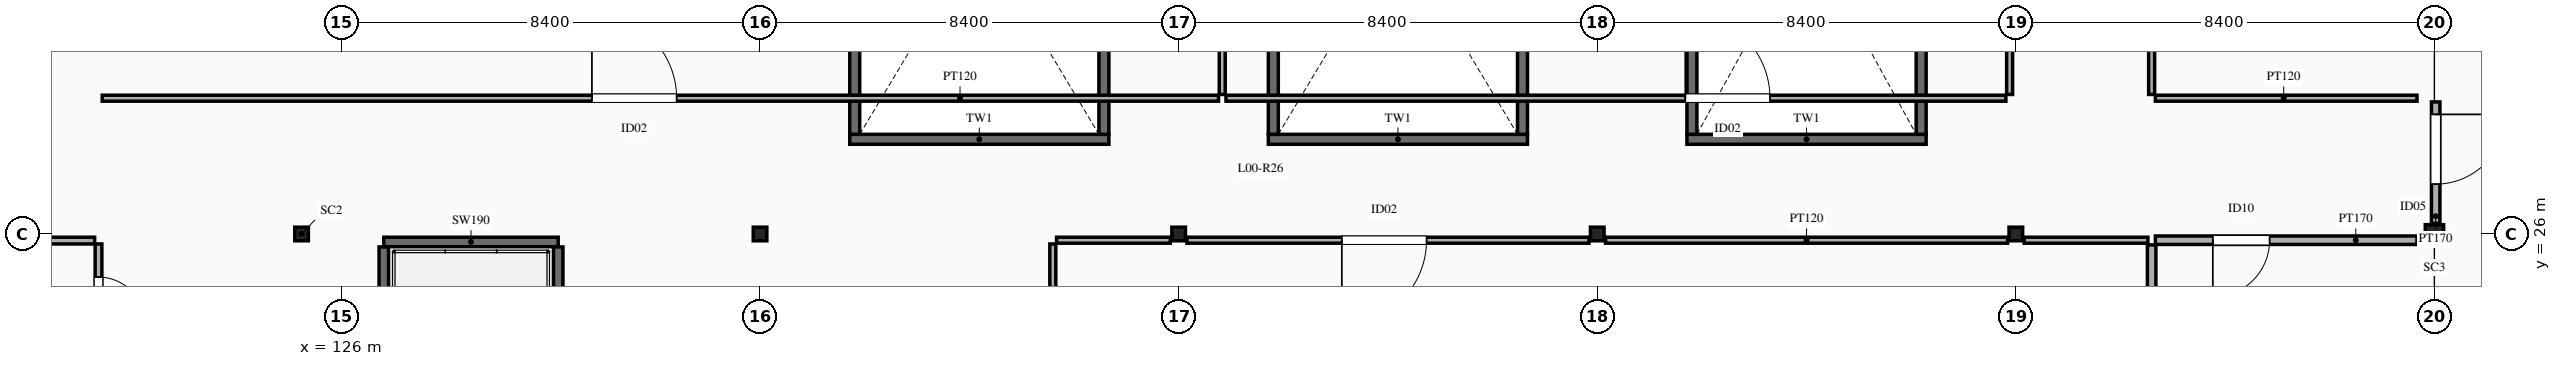
"""IFC4 building model, lengths in metres.
Left out: names, types, materials, properties, quantities, classifications, styles, units other than length and angle.
Written with IfcOpenShell. Run it as: python <this file> out.ifc"""

import sys

from ifc_helpers import new_model, si_unit, direction, frame, frame_2d, origin, origin_2d, place, context, subcontext, project, spatial, rectangle, hollow_circle, i_section, extrude, element, fill, save


model = new_model("IFC4")
c1 = context("Model", 3, precision=1e-05, world=origin(), true_north=direction((0.0, 1.0)))
c2 = subcontext(c1, "Body", "Model", "MODEL_VIEW")
j1 = project(units=[si_unit("LENGTHUNIT", "METRE"), si_unit("PLANEANGLEUNIT", "RADIAN")], contexts=[c1])
p1 = place(None, origin())
s1 = spatial("IfcSite", under=j1, at=p1, CompositionType="ELEMENT")
p2 = place(p1, origin())
s2 = spatial("IfcBuilding", under=s1, at=p2, CompositionType="ELEMENT")
p3 = place(p2, origin())
s3 = spatial("IfcBuildingStorey", under=s2, at=p3, CompositionType="ELEMENT", Elevation=0.0)
p4 = place(p3, frame((168.0, 26.0, 0.0), z_axis=(0.0, 0.0, 1.0), x_axis=(1.0, 0.0, 0.0)))
e1 = element("IfcColumn", 1, at=p4, inside=s3, PredefinedType="COLUMN", context=c2, shape_type="SweptSolid", body=[
    extrude(i_section(OverallWidth=0.373, OverallDepth=0.368, WebThickness=0.014, FlangeThickness=0.024, FilletRadius=0.015, at=origin_2d()), origin(), (0.0, 0.0, 1.0), 5.4),
])
for number, where, z_axis, x_axis in (
    (2, (125.2, 26.0, 0.0), (0.0, 0.0, 1.0), (1.0, 0.0, 0.0)),
    (3, (134.4, 26.0, 0.0), (0.0, 0.0, 1.0), (1.0, 0.0, 0.0)),
    (4, (142.8, 26.0, 0.0), (0.0, 0.0, 1.0), (1.0, 0.0, 0.0)),
    (5, (151.2, 26.0, 0.0), (0.0, 0.0, 1.0), (1.0, 0.0, 0.0)),
    (6, (159.6, 26.0, 0.0), (0.0, 0.0, 1.0), (1.0, 0.0, 0.0)),
):
    element("IfcColumn", number, at=place(p3, frame(where, z_axis=z_axis, x_axis=x_axis)), inside=s3, PredefinedType="COLUMN", context=c2, shape_type="SweptSolid", body=[
        extrude(hollow_circle(Radius=0.136, WallThickness=0.01, at=origin_2d()), origin(), (0.0, 0.0, 1.0), 5.2),
    ])
p5 = place(p3, frame((136.2, 27.9, -0.45), z_axis=(0.0, 0.0, 1.0), x_axis=(1.0, 0.0, 0.0)))
e7 = element("IfcWall", 7, at=p5, inside=s3, PredefinedType="SOLIDWALL", context=c2, shape_type="SweptSolid", body=[
    extrude(rectangle(XDim=5.2, YDim=0.2, at=frame_2d((2.6, 0.0))), origin(), (0.0, 0.0, 1.0), 0.23),
])
for number, where, z_axis, x_axis in (
    (8, (136.3, 28.0, -0.45), (0.0, 0.0, 1.0), (0.0, 1.0, 0.0)),
    (9, (141.3, 28.0, -0.45), (0.0, 0.0, 1.0), (0.0, 1.0, 0.0)),
):
    element("IfcWall", number, at=place(p3, frame(where, z_axis=z_axis, x_axis=x_axis)), inside=s3, PredefinedType="SOLIDWALL", context=c2, shape_type="SweptSolid", body=[
        extrude(rectangle(XDim=8.0, YDim=0.2, at=frame_2d((4.0, 0.0))), origin(), (0.0, 0.0, 1.0), 0.23),
    ])
p6 = place(p3, frame((144.6, 27.9, -0.45), z_axis=(0.0, 0.0, 1.0), x_axis=(1.0, 0.0, 0.0)))
e10 = element("IfcWall", 10, at=p6, inside=s3, PredefinedType="SOLIDWALL", context=c2, shape_type="SweptSolid", body=[
    extrude(rectangle(XDim=5.2, YDim=0.2, at=frame_2d((2.6, 0.0))), origin(), (0.0, 0.0, 1.0), 0.23),
])
for number, where, z_axis, x_axis in (
    (11, (144.7, 28.0, -0.45), (0.0, 0.0, 1.0), (0.0, 1.0, 0.0)),
    (12, (149.7, 28.0, -0.45), (0.0, 0.0, 1.0), (0.0, 1.0, 0.0)),
):
    element("IfcWall", number, at=place(p3, frame(where, z_axis=z_axis, x_axis=x_axis)), inside=s3, PredefinedType="SOLIDWALL", context=c2, shape_type="SweptSolid", body=[
        extrude(rectangle(XDim=8.0, YDim=0.2, at=frame_2d((4.0, 0.0))), origin(), (0.0, 0.0, 1.0), 0.23),
    ])
p7 = place(p3, frame((153.0, 27.9, -0.45), z_axis=(0.0, 0.0, 1.0), x_axis=(1.0, 0.0, 0.0)))
e13 = element("IfcWall", 13, at=p7, inside=s3, PredefinedType="SOLIDWALL", context=c2, shape_type="SweptSolid", body=[
    extrude(rectangle(XDim=4.8, YDim=0.2, at=frame_2d((2.4, 0.0))), origin(), (0.0, 0.0, 1.0), 0.23),
])
for number, where, z_axis, x_axis in (
    (14, (153.1, 28.0, -0.45), (0.0, 0.0, 1.0), (0.0, 1.0, 0.0)),
    (15, (157.7, 28.0, -0.45), (0.0, 0.0, 1.0), (0.0, 1.0, 0.0)),
):
    element("IfcWall", number, at=place(p3, frame(where, z_axis=z_axis, x_axis=x_axis)), inside=s3, PredefinedType="SOLIDWALL", context=c2, shape_type="SweptSolid", body=[
        extrude(rectangle(XDim=8.0, YDim=0.2, at=frame_2d((4.0, 0.0))), origin(), (0.0, 0.0, 1.0), 0.23),
    ])
p8 = place(p3, frame((126.85, 25.84, 0.0), z_axis=(0.0, 0.0, 1.0), x_axis=(1.0, 0.0, 0.0)))
e16 = element("IfcWall", 16, at=p8, inside=s3, PredefinedType="SOLIDWALL", context=c2, shape_type="SweptSolid", body=[
    extrude(rectangle(XDim=3.5, YDim=0.19, at=frame_2d((1.75, 0.0))), origin(), (0.0, 0.0, 1.0), 5.2),
])
p9 = place(p3, frame((126.85, 18.14, 0.0), z_axis=(0.0, 0.0, 1.0), x_axis=(0.0, 1.0, 0.0)))
e17 = element("IfcWall", 17, at=p9, inside=s3, PredefinedType="SOLIDWALL", context=c2, shape_type="SweptSolid", body=[
    extrude(rectangle(XDim=7.6, YDim=0.19, at=frame_2d((3.8, 0.0))), origin(), (0.0, 0.0, 1.0), 5.2),
])
p10 = place(p9, frame((0.66, 0.0, 0.0)))
e18 = element("IfcOpeningElement", 18, at=p10, cuts=e17, PredefinedType="OPENING", context=c2, shape_type="SweptSolid", body=[
    extrude(rectangle(XDim=1.08, YDim=2.15, at=frame_2d((0.54, 1.075))), frame((0.0, 0.105, 0.0), z_axis=(0.0, -1.0, 0.0), x_axis=(1.0, 0.0, 0.0)), (0.0, 0.0, 1.0), 0.21),
])
p11 = place(p3, frame((130.35, 18.14, 0.0), z_axis=(0.0, 0.0, 1.0), x_axis=(0.0, 1.0, 0.0)))
e19 = element("IfcWall", 19, at=p11, inside=s3, PredefinedType="SOLIDWALL", context=c2, shape_type="SweptSolid", body=[
    extrude(rectangle(XDim=7.6, YDim=0.19, at=frame_2d((3.8, 0.0))), origin(), (0.0, 0.0, 1.0), 5.2),
])
p12 = place(p11, frame((0.36, 0.0, 0.0)))
e20 = element("IfcOpeningElement", 20, at=p12, cuts=e19, PredefinedType="OPENING", context=c2, shape_type="SweptSolid", body=[
    extrude(rectangle(XDim=1.08, YDim=2.15, at=frame_2d((0.54, 1.075))), frame((0.0, 0.105, 0.0), z_axis=(0.0, -1.0, 0.0), x_axis=(1.0, 0.0, 0.0)), (0.0, 0.0, 1.0), 0.21),
])
p13 = place(p3, frame((121.125, 23.55, 0.0), z_axis=(0.0, 0.0, 1.0), x_axis=(0.0, 1.0, 0.0)))
e21 = element("IfcWall", 21, at=p13, inside=s3, PredefinedType="PARTITIONING", context=c2, shape_type="SweptSolid", body=[
    extrude(rectangle(XDim=2.25, YDim=0.135, at=frame_2d((1.125, 0.0))), origin(), (0.0, 0.0, 1.0), 4.35),
])
p14 = place(p13, frame((0.665, 0.0, 0.0)))
e22 = element("IfcOpeningElement", 22, at=p14, cuts=e21, PredefinedType="OPENING", context=c2, shape_type="SweptSolid", body=[
    extrude(rectangle(XDim=0.92, YDim=2.12, at=frame_2d((0.46, 1.06))), frame((0.0, 0.077, 0.0), z_axis=(0.0, -1.0, 0.0), x_axis=(1.0, 0.0, 0.0)), (0.0, 0.0, 1.0), 0.155),
])
p15 = place(p3, frame((140.275, 21.35, 0.0), z_axis=(0.0, 0.0, 1.0), x_axis=(0.0, 1.0, 0.0)))
e23 = element("IfcWall", 23, at=p15, inside=s3, PredefinedType="PARTITIONING", context=c2, shape_type="SweptSolid", body=[
    extrude(rectangle(XDim=4.45, YDim=0.12, at=frame_2d((2.225, 0.0))), origin(), (0.0, 0.0, 1.0), 4.35),
])
p16 = place(p3, frame((121.2, 28.725, 0.0), z_axis=(0.0, 0.0, 1.0), x_axis=(1.0, 0.0, 0.0)))
e24 = element("IfcWall", 24, at=p16, inside=s3, PredefinedType="PARTITIONING", context=c2, shape_type="SweptSolid", body=[
    extrude(rectangle(XDim=22.4, YDim=0.12, at=frame_2d((11.2, 0.0))), origin(), (0.0, 0.0, 1.0), 4.35),
])
p17 = place(p16, frame((9.826, 0.0, 0.0)))
e25 = element("IfcOpeningElement", 25, at=p17, cuts=e24, PredefinedType="OPENING", context=c2, shape_type="SweptSolid", body=[
    extrude(rectangle(XDim=1.7, YDim=2.4, at=frame_2d((0.85, 1.2))), frame((0.0, 0.07, 0.0), z_axis=(0.0, -1.0, 0.0), x_axis=(1.0, 0.0, 0.0)), (0.0, 0.0, 1.0), 0.14),
])
p18 = place(p3, frame((140.35, 25.875, 0.0), z_axis=(0.0, 0.0, 1.0), x_axis=(1.0, 0.0, 0.0)))
e26 = element("IfcWall", 26, at=p18, inside=s3, PredefinedType="PARTITIONING", context=c2, shape_type="SweptSolid", body=[
    extrude(rectangle(XDim=2.283, YDim=0.12, at=frame_2d((1.142, 0.0))), origin(), (0.0, 0.0, 1.0), 4.35),
])
p19 = place(p3, frame((142.967, 25.875, 0.0), z_axis=(0.0, 0.0, 1.0), x_axis=(1.0, 0.0, 0.0)))
e27 = element("IfcWall", 27, at=p19, inside=s3, PredefinedType="PARTITIONING", context=c2, shape_type="SweptSolid", body=[
    extrude(rectangle(XDim=8.067, YDim=0.12, at=frame_2d((4.033, 0.0))), origin(), (0.0, 0.0, 1.0), 4.35),
])
p20 = place(p19, frame((3.108, 0.0, 0.0)))
e28 = element("IfcOpeningElement", 28, at=p20, cuts=e27, PredefinedType="OPENING", context=c2, shape_type="SweptSolid", body=[
    extrude(rectangle(XDim=1.7, YDim=2.4, at=frame_2d((0.85, 1.2))), frame((0.0, 0.07, 0.0), z_axis=(0.0, -1.0, 0.0), x_axis=(1.0, 0.0, 0.0)), (0.0, 0.0, 1.0), 0.14),
])
p21 = place(p3, frame((151.366, 25.875, 0.0), z_axis=(0.0, 0.0, 1.0), x_axis=(1.0, 0.0, 0.0)))
e29 = element("IfcWall", 29, at=p21, inside=s3, PredefinedType="PARTITIONING", context=c2, shape_type="SweptSolid", body=[
    extrude(rectangle(XDim=8.067, YDim=0.12, at=frame_2d((4.034, 0.0))), origin(), (0.0, 0.0, 1.0), 4.35),
])
p22 = place(p3, frame((159.767, 25.875, 0.0), z_axis=(0.0, 0.0, 1.0), x_axis=(1.0, 0.0, 0.0)))
e30 = element("IfcWall", 30, at=p22, inside=s3, PredefinedType="PARTITIONING", context=c2, shape_type="SweptSolid", body=[
    extrude(rectangle(XDim=2.483, YDim=0.12, at=frame_2d((1.242, 0.0))), origin(), (0.0, 0.0, 1.0), 4.35),
])
p23 = place(p3, frame((143.75, 28.725, 0.0), z_axis=(0.0, 0.0, 1.0), x_axis=(1.0, 0.0, 0.0)))
e31 = element("IfcWall", 31, at=p23, inside=s3, PredefinedType="PARTITIONING", context=c2, shape_type="SweptSolid", body=[
    extrude(rectangle(XDim=15.65, YDim=0.12, at=frame_2d((7.825, 0.0))), origin(), (0.0, 0.0, 1.0), 4.35),
])
p24 = place(p23, frame((9.217, 0.0, 0.0)))
e32 = element("IfcOpeningElement", 32, at=p24, cuts=e31, PredefinedType="OPENING", context=c2, shape_type="SweptSolid", body=[
    extrude(rectangle(XDim=1.7, YDim=2.4, at=frame_2d((0.85, 1.2))), frame((0.0, 0.07, 0.0), z_axis=(0.0, -1.0, 0.0), x_axis=(1.0, 0.0, 0.0)), (0.0, 0.0, 1.0), 0.14),
])
p25 = place(p3, frame((162.4, 25.875, 0.0), z_axis=(0.0, 0.0, 1.0), x_axis=(1.0, 0.0, 0.0)))
e33 = element("IfcWall", 33, at=p25, inside=s3, PredefinedType="PARTITIONING", context=c2, shape_type="SweptSolid", body=[
    extrude(rectangle(XDim=5.25, YDim=0.17, at=frame_2d((2.625, 0.0))), origin(), (0.0, 0.0, 1.0), 4.35),
])
p26 = place(p25, frame((1.153, 0.0, 0.0)))
e34 = element("IfcOpeningElement", 34, at=p26, cuts=e33, PredefinedType="OPENING", context=c2, shape_type="SweptSolid", body=[
    extrude(rectangle(XDim=1.14, YDim=2.22, at=frame_2d((0.57, 1.11))), frame((0.0, 0.095, 0.0), z_axis=(0.0, -1.0, 0.0), x_axis=(1.0, 0.0, 0.0)), (0.0, 0.0, 1.0), 0.19),
])
p27 = place(p3, frame((162.4, 28.725, 0.0), z_axis=(0.0, 0.0, 1.0), x_axis=(1.0, 0.0, 0.0)))
e35 = element("IfcWall", 35, at=p27, inside=s3, PredefinedType="PARTITIONING", context=c2, shape_type="SweptSolid", body=[
    extrude(rectangle(XDim=5.25, YDim=0.12, at=frame_2d((2.625, 0.0))), origin(), (0.0, 0.0, 1.0), 4.35),
])
p28 = place(p3, frame((168.025, 26.214, 0.0), z_axis=(0.0, 0.0, 1.0), x_axis=(0.0, 1.0, 0.0)))
e36 = element("IfcWall", 36, at=p28, inside=s3, PredefinedType="PARTITIONING", context=c2, shape_type="SweptSolid", body=[
    extrude(rectangle(XDim=2.436, YDim=0.17, at=frame_2d((1.218, 0.0))), origin(), (0.0, 0.0, 1.0), 4.35),
])
p29 = place(p28, frame((0.786, 0.0, 0.0)))
e37 = element("IfcOpeningElement", 37, at=p29, cuts=e36, PredefinedType="OPENING", context=c2, shape_type="SweptSolid", body=[
    extrude(rectangle(XDim=1.4, YDim=2.25, at=frame_2d((0.7, 1.125))), frame((0.0, 0.095, 0.0), z_axis=(0.0, -1.0, 0.0), x_axis=(1.0, 0.0, 0.0)), (0.0, 0.0, 1.0), 0.19),
])
p30 = place(p3, frame((159.475, 28.8, 0.0), z_axis=(0.0, 0.0, 1.0), x_axis=(0.0, 1.0, 0.0)))
e38 = element("IfcWall", 38, at=p30, inside=s3, PredefinedType="PARTITIONING", context=c2, shape_type="SweptSolid", body=[
    extrude(rectangle(XDim=5.433, YDim=0.12, at=frame_2d((2.717, 0.0))), origin(), (0.0, 0.0, 1.0), 4.35),
])
p31 = place(p3, frame((162.325, 28.8, 0.0), z_axis=(0.0, 0.0, 1.0), x_axis=(0.0, 1.0, 0.0)))
e39 = element("IfcWall", 39, at=p31, inside=s3, PredefinedType="PARTITIONING", context=c2, shape_type="SweptSolid", body=[
    extrude(rectangle(XDim=13.6, YDim=0.12, at=frame_2d((6.8, 0.0))), origin(), (0.0, 0.0, 1.0), 4.35),
])
p32 = place(p31, frame((7.335, 0.0, 0.0)))
e40 = element("IfcOpeningElement", 40, at=p32, cuts=e39, PredefinedType="OPENING", context=c2, shape_type="SweptSolid", body=[
    extrude(rectangle(XDim=1.04, YDim=2.15, at=frame_2d((0.52, 1.075))), frame((0.0, 0.07, 0.0), z_axis=(0.0, -1.0, 0.0), x_axis=(1.0, 0.0, 0.0)), (0.0, 0.0, 1.0), 0.14),
])
p33 = place(p3, frame((143.675, 28.8, 0.0), z_axis=(0.0, 0.0, 1.0), x_axis=(0.0, 1.0, 0.0)))
e41 = element("IfcWall", 41, at=p33, inside=s3, PredefinedType="PARTITIONING", context=c2, shape_type="SweptSolid", body=[
    extrude(rectangle(XDim=19.0, YDim=0.12, at=frame_2d((9.5, 0.0))), origin(), (0.0, 0.0, 1.0), 4.35),
])
p34 = place(p3, frame((162.325, 18.0, 0.0), z_axis=(0.0, 0.0, 1.0), x_axis=(0.0, 1.0, 0.0)))
e42 = element("IfcWall", 42, at=p34, inside=s3, PredefinedType="PARTITIONING", context=c2, shape_type="SweptSolid", body=[
    extrude(rectangle(XDim=7.78, YDim=0.17, at=frame_2d((3.89, 0.0))), origin(), (0.0, 0.0, 1.0), 4.35),
])
p35 = place(p3, frame((118.0, 25.867, 0.0), z_axis=(0.0, 0.0, 1.0), x_axis=(1.0, 0.0, 0.0)))
e43 = element("IfcWall", 43, at=p35, inside=s3, PredefinedType="PARTITIONING", context=c2, shape_type="SweptSolid", body=[
    extrude(rectangle(XDim=3.048, YDim=0.135, at=frame_2d((1.524, 0.0))), origin(), (0.0, 0.0, 1.0), 4.35),
])
p36 = place(p14, frame((0.92, 0.0, 0.0), z_axis=(0.0, 0.0, 1.0), x_axis=(-1.0, 0.0, 0.0)))
e44 = element("IfcDoor", 44, at=p36, inside=s3, OperationType="SINGLE_SWING_RIGHT", PredefinedType="DOOR", context=c2, shape_type="SweptSolid", body=[
    extrude(rectangle(XDim=0.92, YDim=2.12, at=frame_2d((0.46, 1.06))), frame((0.0, 0.025, 0.0), z_axis=(0.0, -1.0, 0.0), x_axis=(1.0, 0.0, 0.0)), (0.0, 0.0, 1.0), 0.05),
])
fill(e22, e44)
p37 = place(p17, origin())
e45 = element("IfcDoor", 45, at=p37, inside=s3, OperationType="SINGLE_SWING_LEFT", PredefinedType="DOOR", context=c2, shape_type="SweptSolid", body=[
    extrude(rectangle(XDim=1.7, YDim=2.4, at=frame_2d((0.85, 1.2))), frame((0.0, 0.025, 0.0), z_axis=(0.0, -1.0, 0.0), x_axis=(1.0, 0.0, 0.0)), (0.0, 0.0, 1.0), 0.05),
])
fill(e25, e45)
p38 = place(p20, frame((1.7, 0.0, 0.0), z_axis=(0.0, 0.0, 1.0), x_axis=(-1.0, 0.0, 0.0)))
e46 = element("IfcDoor", 46, at=p38, inside=s3, OperationType="SINGLE_SWING_RIGHT", PredefinedType="DOOR", context=c2, shape_type="SweptSolid", body=[
    extrude(rectangle(XDim=1.7, YDim=2.4, at=frame_2d((0.85, 1.2))), frame((0.0, 0.025, 0.0), z_axis=(0.0, -1.0, 0.0), x_axis=(1.0, 0.0, 0.0)), (0.0, 0.0, 1.0), 0.05),
])
fill(e28, e46)
p39 = place(p24, origin())
e47 = element("IfcDoor", 47, at=p39, inside=s3, OperationType="SINGLE_SWING_LEFT", PredefinedType="DOOR", context=c2, shape_type="SweptSolid", body=[
    extrude(rectangle(XDim=1.7, YDim=2.4, at=frame_2d((0.85, 1.2))), frame((0.0, 0.025, 0.0), z_axis=(0.0, -1.0, 0.0), x_axis=(1.0, 0.0, 0.0)), (0.0, 0.0, 1.0), 0.05),
])
fill(e32, e47)
p40 = place(p26, frame((1.14, 0.0, 0.0), z_axis=(0.0, 0.0, 1.0), x_axis=(-1.0, 0.0, 0.0)))
e48 = element("IfcDoor", 48, at=p40, inside=s3, OperationType="SINGLE_SWING_RIGHT", PredefinedType="DOOR", context=c2, shape_type="SweptSolid", body=[
    extrude(rectangle(XDim=1.14, YDim=2.22, at=frame_2d((0.57, 1.11))), frame((0.0, 0.025, 0.0), z_axis=(0.0, -1.0, 0.0), x_axis=(1.0, 0.0, 0.0)), (0.0, 0.0, 1.0), 0.05),
])
fill(e34, e48)
p41 = place(p29, frame((1.4, 0.0, 0.0), z_axis=(0.0, 0.0, 1.0), x_axis=(-1.0, 0.0, 0.0)))
e49 = element("IfcDoor", 49, at=p41, inside=s3, OperationType="SINGLE_SWING_LEFT", PredefinedType="DOOR", context=c2, shape_type="SweptSolid", body=[
    extrude(rectangle(XDim=1.4, YDim=2.25, at=frame_2d((0.7, 1.125))), frame((0.0, 0.025, 0.0), z_axis=(0.0, -1.0, 0.0), x_axis=(1.0, 0.0, 0.0)), (0.0, 0.0, 1.0), 0.05),
])
fill(e37, e49)
save(model, sys.argv[1])
